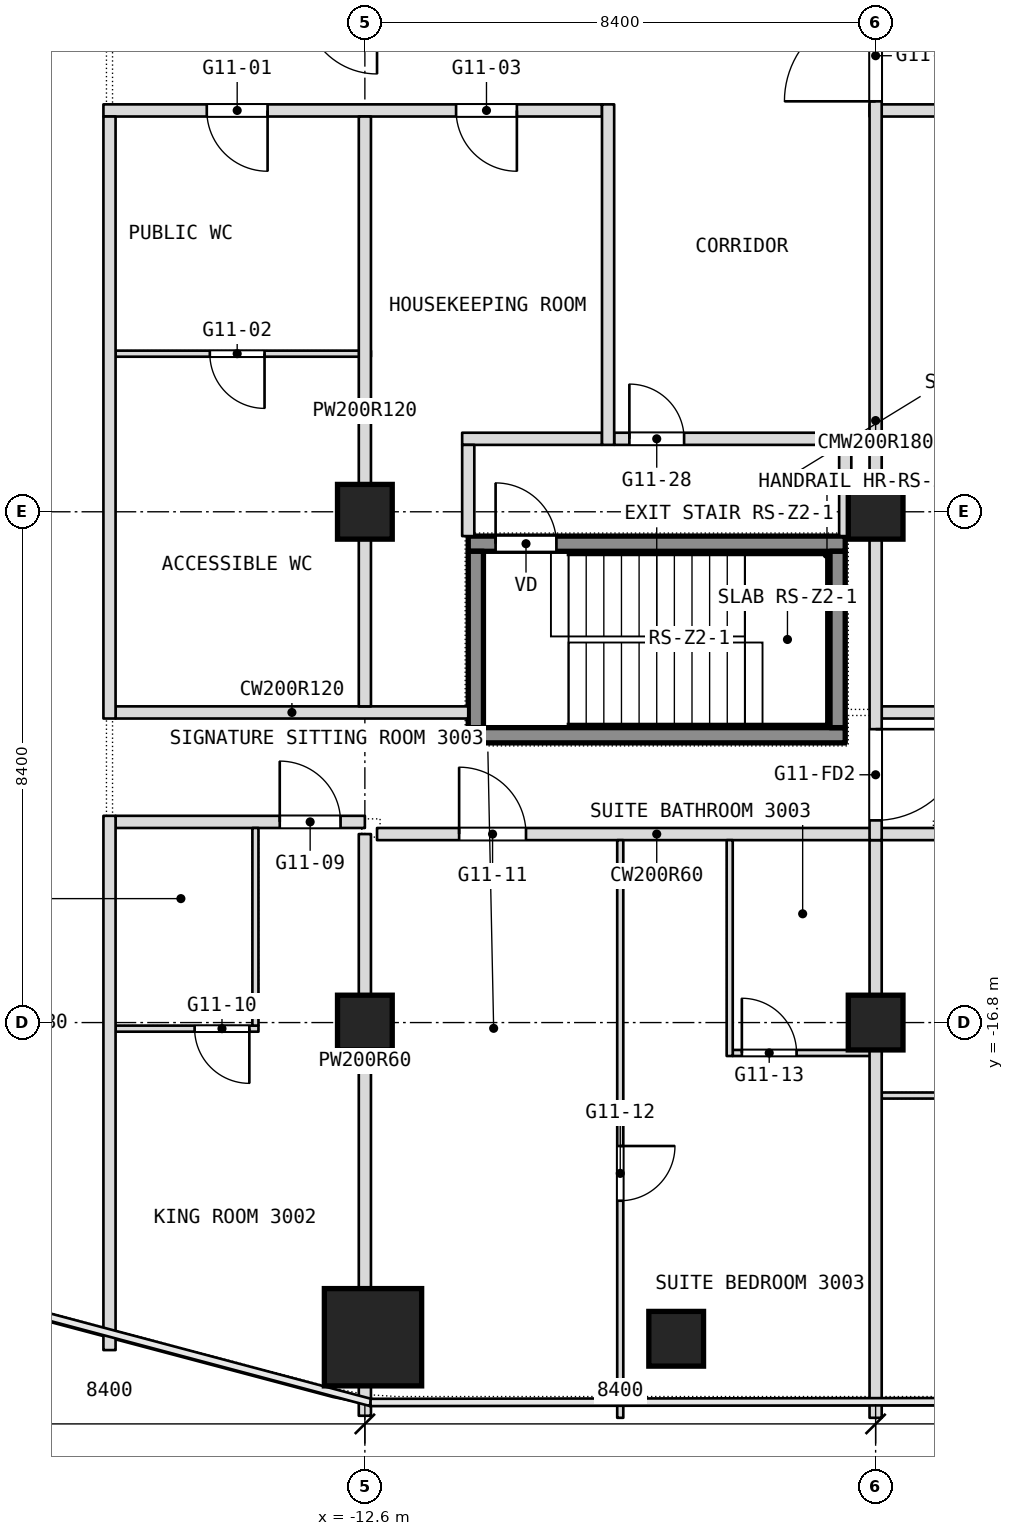
"""IFC4 building model, lengths in metres.
Left out: names, types, materials, properties, quantities, classifications, styles, units other than length and angle.
Written with IfcOpenShell. Run it as: python <this file> out.ifc"""

import sys

from ifc_helpers import new_model, si_unit, direction, frame, frame_2d, origin, origin_2d, place, context, subcontext, project, spatial, rectangle, extrude, element, fill, save


model = new_model("IFC4")
c1 = context("Model", 3, precision=1e-05, world=origin(), true_north=direction((0.0, 1.0)))
c2 = subcontext(c1, "Body", "Model", "MODEL_VIEW")
j1 = project(units=[si_unit("LENGTHUNIT", "METRE"), si_unit("PLANEANGLEUNIT", "RADIAN")], contexts=[c1])
p1 = place(None, origin())
s1 = spatial("IfcSite", under=j1, at=p1, CompositionType="ELEMENT")
p2 = place(p1, origin())
s2 = spatial("IfcBuilding", under=s1, at=p2, CompositionType="ELEMENT")
p3 = place(p2, frame((0.0, 0.0, 133.7)))
s3 = spatial("IfcBuildingStorey", under=s2, at=p3, CompositionType="ELEMENT", Elevation=133.7)
p4 = place(p3, frame((-12.466, -21.975, 0.0), z_axis=(0.0, 0.0, 1.0), x_axis=(1.0, 0.0, 0.0)))
e1 = element("IfcColumn", 1, at=p4, inside=s3, PredefinedType="COLUMN", context=c2, shape_type="SweptSolid", body=[
    extrude(rectangle(XDim=1.6, YDim=1.6, at=origin_2d()), origin(), (0.0, 0.0, 1.0), 3.6),
])
for number, where, z_axis, x_axis in (
    (2, (-12.6, -16.8, 0.0), (0.0, 0.0, 1.0), (1.0, 0.0, 0.0)),
    (3, (-12.6, -8.4, 0.0), (0.0, 0.0, 1.0), (1.0, 0.0, 0.0)),
    (4, (-4.2, -16.8, 0.0), (0.0, 0.0, 1.0), (1.0, 0.0, 0.0)),
    (5, (-4.2, -8.4, 0.0), (0.0, 0.0, 1.0), (1.0, 0.0, 0.0)),
    (6, (-7.48, -22.0, 0.0), (0.0, 0.0, 1.0), (1.0, 0.0, 0.0)),
):
    element("IfcColumn", number, at=place(p3, frame(where, z_axis=z_axis, x_axis=x_axis)), inside=s3, PredefinedType="COLUMN", context=c2, shape_type="SweptSolid", body=[
        extrude(rectangle(XDim=0.9, YDim=0.9, at=origin_2d()), origin(), (0.0, 0.0, 1.0), 3.6),
    ])
p5 = place(p3, frame((-4.1, -18.0, 0.0), z_axis=(0.0, 0.0, 1.0), x_axis=(1.0, 0.0, 0.0)))
e7 = element("IfcWall", 7, at=p5, inside=s3, PredefinedType="PARTITIONING", context=c2, shape_type="SweptSolid", body=[
    extrude(rectangle(XDim=3.55, YDim=0.1, at=frame_2d((1.775, 0.0))), origin(), (0.0, 0.0, 1.0), 3.34),
])
p6 = place(p3, frame((-6.55, -17.3, 0.0), z_axis=(0.0, 0.0, 1.0), x_axis=(1.0, 0.0, 0.0)))
e8 = element("IfcWall", 8, at=p6, inside=s3, PredefinedType="PARTITIONING", context=c2, shape_type="SweptSolid", body=[
    extrude(rectangle(XDim=2.45, YDim=0.1, at=frame_2d((1.225, 0.0))), origin(), (0.0, 0.0, 1.0), 3.34),
])
p7 = place(p6, frame((0.15, 0.0, 0.0)))
e9 = element("IfcOpeningElement", 9, at=p7, cuts=e8, PredefinedType="OPENING", context=c2, shape_type="SweptSolid", body=[
    extrude(rectangle(XDim=0.9, YDim=2.1, at=frame_2d((0.45, 1.05))), frame((0.0, 0.05, 0.0), z_axis=(0.0, -1.0, 0.0), x_axis=(1.0, 0.0, 0.0)), (0.0, 0.0, 1.0), 0.1),
])
p8 = place(p3, frame((-16.7, -16.9, 0.0), z_axis=(0.0, 0.0, 1.0), x_axis=(1.0, 0.0, 0.0)))
e10 = element("IfcWall", 10, at=p8, inside=s3, PredefinedType="PARTITIONING", context=c2, shape_type="SweptSolid", body=[
    extrude(rectangle(XDim=2.35, YDim=0.1, at=frame_2d((1.175, 0.0))), origin(), (0.0, 0.0, 1.0), 2.89),
])
p9 = place(p8, frame((1.3, 0.0, 0.0)))
e11 = element("IfcOpeningElement", 11, at=p9, cuts=e10, PredefinedType="OPENING", context=c2, shape_type="SweptSolid", body=[
    extrude(rectangle(XDim=0.9, YDim=2.1, at=frame_2d((0.45, 1.05))), frame((0.0, 0.05, 0.0), z_axis=(0.0, -1.0, 0.0), x_axis=(1.0, 0.0, 0.0)), (0.0, 0.0, 1.0), 0.1),
])
p10 = place(p3, frame((-12.4, -13.7, 0.0), z_axis=(0.0, 0.0, 1.0), x_axis=(1.0, 0.0, 0.0)))
e12 = element("IfcWall", 12, at=p10, inside=s3, PredefinedType="PARTITIONING", context=c2, shape_type="SweptSolid", body=[
    extrude(rectangle(XDim=9.2, YDim=0.2, at=frame_2d((4.6, 0.0))), origin(), (0.0, 0.0, 1.0), 3.34),
])
p11 = place(p10, frame((1.35, 0.0, 0.0)))
e13 = element("IfcOpeningElement", 13, at=p11, cuts=e12, PredefinedType="OPENING", context=c2, shape_type="SweptSolid", body=[
    extrude(rectangle(XDim=1.1, YDim=2.1, at=frame_2d((0.55, 1.05))), frame((0.0, 0.1, 0.0), z_axis=(0.0, -1.0, 0.0), x_axis=(1.0, 0.0, 0.0)), (0.0, 0.0, 1.0), 0.2),
])
p12 = place(p3, frame((-16.7, -13.5, 0.0), z_axis=(0.0, 0.0, 1.0), x_axis=(1.0, 0.0, 0.0)))
e14 = element("IfcWall", 14, at=p12, inside=s3, PredefinedType="PARTITIONING", context=c2, shape_type="SweptSolid", body=[
    extrude(rectangle(XDim=4.1, YDim=0.2, at=frame_2d((2.05, 0.0))), origin(), (0.0, 0.0, 1.0), 3.34),
])
p13 = place(p12, frame((2.7, 0.0, 0.0)))
e15 = element("IfcOpeningElement", 15, at=p13, cuts=e14, PredefinedType="OPENING", context=c2, shape_type="SweptSolid", body=[
    extrude(rectangle(XDim=1.0, YDim=2.1, at=frame_2d((0.5, 1.05))), frame((0.0, 0.1, 0.0), z_axis=(0.0, -1.0, 0.0), x_axis=(1.0, 0.0, 0.0)), (0.0, 0.0, 1.0), 0.2),
])
p14 = place(p3, frame((-16.7, -11.7, 0.0), z_axis=(0.0, 0.0, 1.0), x_axis=(1.0, 0.0, 0.0)))
e16 = element("IfcWall", 16, at=p14, inside=s3, PredefinedType="PARTITIONING", context=c2, shape_type="SweptSolid", body=[
    extrude(rectangle(XDim=5.8, YDim=0.2, at=frame_2d((2.9, 0.0))), origin(), (0.0, 0.0, 1.0), 3.34),
])
p15 = place(p3, frame((-4.1, -11.7, 0.0), z_axis=(0.0, 0.0, 1.0), x_axis=(1.0, 0.0, 0.0)))
e17 = element("IfcWall", 17, at=p15, inside=s3, PredefinedType="PARTITIONING", context=c2, shape_type="SweptSolid", body=[
    extrude(rectangle(XDim=20.8, YDim=0.2, at=frame_2d((10.4, 0.0))), origin(), (0.0, 0.0, 1.0), 3.34),
])
p16 = place(p15, frame((14.1, 0.0, 0.0)))
e18 = element("IfcOpeningElement", 18, at=p16, cuts=e17, PredefinedType="OPENING", context=c2, shape_type="SweptSolid", body=[
    extrude(rectangle(XDim=1.0, YDim=2.1, at=frame_2d((0.5, 1.05))), frame((0.0, 0.1, 0.0), z_axis=(0.0, -1.0, 0.0), x_axis=(1.0, 0.0, 0.0)), (0.0, 0.0, 1.0), 0.2),
])
p17 = place(p3, frame((-11.0, -7.2, 0.0), z_axis=(0.0, 0.0, 1.0), x_axis=(1.0, 0.0, 0.0)))
e19 = element("IfcWall", 19, at=p17, inside=s3, PredefinedType="PARTITIONING", context=c2, shape_type="SweptSolid", body=[
    extrude(rectangle(XDim=2.3, YDim=0.2, at=frame_2d((1.15, 0.0))), origin(), (0.0, 0.0, 1.0), 3.34),
])
p18 = place(p3, frame((-8.5, -7.2, 0.0), z_axis=(0.0, 0.0, 1.0), x_axis=(1.0, 0.0, 0.0)))
e20 = element("IfcWall", 20, at=p18, inside=s3, PredefinedType="PARTITIONING", context=c2, shape_type="SweptSolid", body=[
    extrude(rectangle(XDim=3.7, YDim=0.2, at=frame_2d((1.85, 0.0))), origin(), (0.0, 0.0, 1.0), 3.34),
])
p19 = place(p18, frame((0.25, 0.0, 0.0)))
e21 = element("IfcOpeningElement", 21, at=p19, cuts=e20, PredefinedType="OPENING", context=c2, shape_type="SweptSolid", body=[
    extrude(rectangle(XDim=0.9, YDim=2.1, at=frame_2d((0.45, 1.05))), frame((0.0, 0.1, 0.0), z_axis=(0.0, -1.0, 0.0), x_axis=(1.0, 0.0, 0.0)), (0.0, 0.0, 1.0), 0.2),
])
p20 = place(p3, frame((-16.7, -5.8, 0.0), z_axis=(0.0, 0.0, 1.0), x_axis=(1.0, 0.0, 0.0)))
e22 = element("IfcWall", 22, at=p20, inside=s3, PredefinedType="PARTITIONING", context=c2, shape_type="SweptSolid", body=[
    extrude(rectangle(XDim=4.2, YDim=0.1, at=frame_2d((2.1, 0.0))), origin(), (0.0, 0.0, 1.0), 3.34),
])
p21 = place(p20, frame((1.55, 0.0, 0.0)))
e23 = element("IfcOpeningElement", 23, at=p21, cuts=e22, PredefinedType="OPENING", context=c2, shape_type="SweptSolid", body=[
    extrude(rectangle(XDim=0.9, YDim=2.1, at=frame_2d((0.45, 1.05))), frame((0.0, 0.05, 0.0), z_axis=(0.0, -1.0, 0.0), x_axis=(1.0, 0.0, 0.0)), (0.0, 0.0, 1.0), 0.1),
])
p22 = place(p3, frame((-16.9, -1.8, 0.0), z_axis=(0.0, 0.0, 1.0), x_axis=(1.0, 0.0, 0.0)))
e24 = element("IfcWall", 24, at=p22, inside=s3, PredefinedType="PARTITIONING", context=c2, shape_type="SweptSolid", body=[
    extrude(rectangle(XDim=8.2, YDim=0.2, at=frame_2d((4.1, 0.0))), origin(), (0.0, 0.0, 1.0), 3.34),
])
p23 = place(p22, frame((1.7, 0.0, 0.0)))
e25 = element("IfcOpeningElement", 25, at=p23, cuts=e24, PredefinedType="OPENING", context=c2, shape_type="SweptSolid", body=[
    extrude(rectangle(XDim=1.0, YDim=2.1, at=frame_2d((0.5, 1.05))), frame((0.0, 0.1, 0.0), z_axis=(0.0, -1.0, 0.0), x_axis=(1.0, 0.0, 0.0)), (0.0, 0.0, 1.0), 0.2),
])
p24 = place(p22, frame((5.8, 0.0, 0.0)))
e26 = element("IfcOpeningElement", 26, at=p24, cuts=e24, PredefinedType="OPENING", context=c2, shape_type="SweptSolid", body=[
    extrude(rectangle(XDim=1.0, YDim=2.1, at=frame_2d((0.5, 1.05))), frame((0.0, 0.1, 0.0), z_axis=(0.0, -1.0, 0.0), x_axis=(1.0, 0.0, 0.0)), (0.0, 0.0, 1.0), 0.2),
])
p25 = place(p3, frame((-4.3, -1.8, 0.0), z_axis=(0.0, 0.0, 1.0), x_axis=(1.0, 0.0, 0.0)))
e27 = element("IfcWall", 27, at=p25, inside=s3, PredefinedType="PARTITIONING", context=c2, shape_type="SweptSolid", body=[
    extrude(rectangle(XDim=11.3, YDim=0.2, at=frame_2d((5.65, 0.0))), origin(), (0.0, 0.0, 1.0), 3.34),
])
p26 = place(p25, frame((3.4, 0.0, 0.0)))
e28 = element("IfcOpeningElement", 28, at=p26, cuts=e27, PredefinedType="OPENING", context=c2, shape_type="SweptSolid", body=[
    extrude(rectangle(XDim=1.8, YDim=2.1, at=frame_2d((0.9, 1.05))), frame((0.0, 0.1, 0.0), z_axis=(0.0, -1.0, 0.0), x_axis=(1.0, 0.0, 0.0)), (0.0, 0.0, 1.0), 0.2),
])
p27 = place(p25, frame((10.1, 0.0, 0.0)))
e29 = element("IfcOpeningElement", 29, at=p27, cuts=e27, PredefinedType="OPENING", context=c2, shape_type="SweptSolid", body=[
    extrude(rectangle(XDim=1.0, YDim=2.1, at=frame_2d((0.5, 1.05))), frame((0.0, 0.1, 0.0), z_axis=(0.0, -1.0, 0.0), x_axis=(1.0, 0.0, 0.0)), (0.0, 0.0, 1.0), 0.2),
])
p28 = place(p3, frame((-4.2, -23.3, 0.0), z_axis=(0.0, 0.0, 1.0), x_axis=(0.0, 1.0, 0.0)))
e30 = element("IfcWall", 30, at=p28, inside=s3, PredefinedType="PARTITIONING", context=c2, shape_type="SweptSolid", body=[
    extrude(rectangle(XDim=9.5, YDim=0.2, at=frame_2d((4.75, 0.0))), origin(), (0.0, 0.0, 1.0), 3.34),
])
p29 = place(p3, frame((-4.2, -13.8, 0.0), z_axis=(0.0, 0.0, 1.0), x_axis=(0.0, 1.0, 0.0)))
e31 = element("IfcWall", 31, at=p29, inside=s3, PredefinedType="PARTITIONING", context=c2, shape_type="SweptSolid", body=[
    extrude(rectangle(XDim=13.8, YDim=0.2, at=frame_2d((6.9, 0.0))), origin(), (0.0, 0.0, 1.0), 3.34),
])
p30 = place(p29, frame((12.15, 0.0, 0.0)))
e32 = element("IfcOpeningElement", 32, at=p30, cuts=e31, PredefinedType="OPENING", context=c2, shape_type="SweptSolid", body=[
    extrude(rectangle(XDim=1.5, YDim=2.1, at=frame_2d((0.75, 1.05))), frame((0.0, 0.1, 0.0), z_axis=(0.0, -1.0, 0.0), x_axis=(1.0, 0.0, 0.0)), (0.0, 0.0, 1.0), 0.2),
])
p31 = place(p29, frame((0.325, 0.0, 0.0)))
e33 = element("IfcOpeningElement", 33, at=p31, cuts=e31, PredefinedType="OPENING", context=c2, shape_type="SweptSolid", body=[
    extrude(rectangle(XDim=1.5, YDim=2.1, at=frame_2d((0.75, 1.05))), frame((0.0, 0.1, 0.0), z_axis=(0.0, -1.0, 0.0), x_axis=(1.0, 0.0, 0.0)), (0.0, 0.0, 1.0), 0.2),
])
p32 = place(p3, frame((-4.7, -8.8, 0.0), z_axis=(0.0, 0.0, 1.0), x_axis=(0.0, 1.0, 0.0)))
e34 = element("IfcWall", 34, at=p32, inside=s3, PredefinedType="PARTITIONING", context=c2, shape_type="SweptSolid", body=[
    extrude(rectangle(XDim=1.7, YDim=0.2, at=frame_2d((0.85, 0.0))), origin(), (0.0, 0.0, 1.0), 3.34),
])
p33 = place(p3, frame((-6.6, -17.35, 0.0), z_axis=(0.0, 0.0, 1.0), x_axis=(0.0, 1.0, 0.0)))
e35 = element("IfcWall", 35, at=p33, inside=s3, PredefinedType="PARTITIONING", context=c2, shape_type="SweptSolid", body=[
    extrude(rectangle(XDim=3.55, YDim=0.1, at=frame_2d((1.775, 0.0))), origin(), (0.0, 0.0, 1.0), 3.34),
])
p34 = place(p3, frame((-8.4, -23.3, 0.0), z_axis=(0.0, 0.0, 1.0), x_axis=(0.0, 1.0, 0.0)))
e36 = element("IfcWall", 36, at=p34, inside=s3, PredefinedType="PARTITIONING", context=c2, shape_type="SweptSolid", body=[
    extrude(rectangle(XDim=9.5, YDim=0.1, at=frame_2d((4.75, 0.0))), origin(), (0.0, 0.0, 1.0), 3.34),
])
p35 = place(p34, frame((3.57, 0.0, 0.0)))
e37 = element("IfcOpeningElement", 37, at=p35, cuts=e36, PredefinedType="OPENING", context=c2, shape_type="SweptSolid", body=[
    extrude(rectangle(XDim=0.9, YDim=2.1, at=frame_2d((0.45, 1.05))), frame((0.0, 0.05, 0.0), z_axis=(0.0, -1.0, 0.0), x_axis=(1.0, 0.0, 0.0)), (0.0, 0.0, 1.0), 0.1),
])
p36 = place(p3, frame((-8.6, -7.3, 0.0), z_axis=(0.0, 0.0, 1.0), x_axis=(0.0, 1.0, 0.0)))
e38 = element("IfcWall", 38, at=p36, inside=s3, PredefinedType="PARTITIONING", context=c2, shape_type="SweptSolid", body=[
    extrude(rectangle(XDim=5.6, YDim=0.2, at=frame_2d((2.8, 0.0))), origin(), (0.0, 0.0, 1.0), 3.34),
])
p37 = place(p3, frame((-10.9, -8.8, 0.0), z_axis=(0.0, 0.0, 1.0), x_axis=(0.0, 1.0, 0.0)))
e39 = element("IfcWall", 39, at=p37, inside=s3, PredefinedType="PARTITIONING", context=c2, shape_type="SweptSolid", body=[
    extrude(rectangle(XDim=1.5, YDim=0.2, at=frame_2d((0.75, 0.0))), origin(), (0.0, 0.0, 1.0), 3.34),
])
p38 = place(p3, frame((-12.6, -23.266, 0.0), z_axis=(0.0, 0.0, 1.0), x_axis=(0.0, 1.0, 0.0)))
e40 = element("IfcWall", 40, at=p38, inside=s3, PredefinedType="PARTITIONING", context=c2, shape_type="SweptSolid", body=[
    extrude(rectangle(XDim=0.491, YDim=0.2, at=frame_2d((0.246, 0.0))), origin(), (0.0, 0.0, 1.0), 3.34),
])
p39 = place(p3, frame((-12.6, -21.175, 0.0), z_axis=(0.0, 0.0, 1.0), x_axis=(0.0, 1.0, 0.0)))
e41 = element("IfcWall", 41, at=p39, inside=s3, PredefinedType="PARTITIONING", context=c2, shape_type="SweptSolid", body=[
    extrude(rectangle(XDim=7.475, YDim=0.2, at=frame_2d((3.738, 0.0))), origin(), (0.0, 0.0, 1.0), 3.34),
])
p40 = place(p3, frame((-12.6, -11.6, 0.0), z_axis=(0.0, 0.0, 1.0), x_axis=(0.0, 1.0, 0.0)))
e42 = element("IfcWall", 42, at=p40, inside=s3, PredefinedType="PARTITIONING", context=c2, shape_type="SweptSolid", body=[
    extrude(rectangle(XDim=9.7, YDim=0.2, at=frame_2d((4.85, 0.0))), origin(), (0.0, 0.0, 1.0), 3.34),
])
p41 = place(p3, frame((-14.4, -16.85, 0.0), z_axis=(0.0, 0.0, 1.0), x_axis=(0.0, 1.0, 0.0)))
e43 = element("IfcWall", 43, at=p41, inside=s3, PredefinedType="PARTITIONING", context=c2, shape_type="SweptSolid", body=[
    extrude(rectangle(XDim=3.25, YDim=0.1, at=frame_2d((1.625, 0.0))), origin(), (0.0, 0.0, 1.0), 3.34),
])
p42 = place(p3, frame((-16.8, -22.186, 0.0), z_axis=(0.0, 0.0, 1.0), x_axis=(0.0, 1.0, 0.0)))
e44 = element("IfcWall", 44, at=p42, inside=s3, PredefinedType="PARTITIONING", context=c2, shape_type="SweptSolid", body=[
    extrude(rectangle(XDim=8.786, YDim=0.2, at=frame_2d((4.393, 0.0))), origin(), (0.0, 0.0, 1.0), 3.34),
])
p43 = place(p3, frame((-16.8, -11.8, 0.0), z_axis=(0.0, 0.0, 1.0), x_axis=(0.0, 1.0, 0.0)))
e45 = element("IfcWall", 45, at=p43, inside=s3, PredefinedType="PARTITIONING", context=c2, shape_type="SweptSolid", body=[
    extrude(rectangle(XDim=9.9, YDim=0.2, at=frame_2d((4.95, 0.0))), origin(), (0.0, 0.0, 1.0), 3.34),
])
p44 = place(p3, frame((-10.9, -12.075, 0.1), z_axis=(0.0, 0.0, 1.0), x_axis=(1.0, 0.0, 0.0)))
e46 = element("IfcWall", 46, at=p44, inside=s3, PredefinedType="SHEAR", context=c2, shape_type="SweptSolid", body=[
    extrude(rectangle(XDim=6.2, YDim=0.25, at=frame_2d((3.1, 0.0))), origin(), (0.0, 0.0, 1.0), 3.6),
])
p45 = place(p3, frame((-10.9, -8.925, 0.1), z_axis=(0.0, 0.0, 1.0), x_axis=(1.0, 0.0, 0.0)))
e47 = element("IfcWall", 47, at=p45, inside=s3, PredefinedType="SHEAR", context=c2, shape_type="SweptSolid", body=[
    extrude(rectangle(XDim=6.2, YDim=0.25, at=frame_2d((3.1, 0.0))), origin(), (0.0, 0.0, 1.0), 3.6),
])
p46 = place(p45, frame((0.45, 0.0, 0.0)))
e48 = element("IfcOpeningElement", 48, at=p46, cuts=e47, PredefinedType="OPENING", context=c2, shape_type="SweptSolid", body=[
    extrude(rectangle(XDim=1.0, YDim=2.1, at=frame_2d((0.5, 1.05))), frame((0.0, 0.125, 0.0), z_axis=(0.0, -1.0, 0.0), x_axis=(1.0, 0.0, 0.0)), (0.0, 0.0, 1.0), 0.25),
])
for number, where, z_axis, x_axis in (
    (49, (-10.775, -11.95, 0.1), (0.0, 0.0, 1.0), (0.0, 1.0, 0.0)),
    (50, (-4.825, -11.95, 0.1), (0.0, 0.0, 1.0), (0.0, 1.0, 0.0)),
):
    element("IfcWall", number, at=place(p3, frame(where, z_axis=z_axis, x_axis=x_axis)), inside=s3, PredefinedType="SHEAR", context=c2, shape_type="SweptSolid", body=[
        extrude(rectangle(XDim=2.9, YDim=0.25, at=frame_2d((1.45, 0.0))), origin(), (0.0, 0.0, 1.0), 3.6),
    ])
p47 = place(p7, origin())
e51 = element("IfcDoor", 51, at=p47, inside=s3, OperationType="SINGLE_SWING_LEFT", PredefinedType="DOOR", context=c2, shape_type="SweptSolid", body=[
    extrude(rectangle(XDim=0.9, YDim=2.1, at=frame_2d((0.45, 1.05))), frame((0.0, 0.025, 0.0), z_axis=(0.0, -1.0, 0.0), x_axis=(1.0, 0.0, 0.0)), (0.0, 0.0, 1.0), 0.05),
])
fill(e9, e51)
p48 = place(p9, origin())
e52 = element("IfcDoor", 52, at=p48, inside=s3, OperationType="SINGLE_SWING_RIGHT", PredefinedType="DOOR", context=c2, shape_type="SweptSolid", body=[
    extrude(rectangle(XDim=0.9, YDim=2.1, at=frame_2d((0.45, 1.05))), frame((0.0, 0.025, 0.0), z_axis=(0.0, -1.0, 0.0), x_axis=(1.0, 0.0, 0.0)), (0.0, 0.0, 1.0), 0.05),
])
fill(e11, e52)
p49 = place(p11, origin())
e53 = element("IfcDoor", 53, at=p49, inside=s3, OperationType="SINGLE_SWING_RIGHT", PredefinedType="DOOR", context=c2, shape_type="SweptSolid", body=[
    extrude(rectangle(XDim=1.1, YDim=2.1, at=frame_2d((0.55, 1.05))), frame((0.0, 0.025, 0.0), z_axis=(0.0, -1.0, 0.0), x_axis=(1.0, 0.0, 0.0)), (0.0, 0.0, 1.0), 0.05),
])
fill(e13, e53)
p50 = place(p13, origin())
e54 = element("IfcDoor", 54, at=p50, inside=s3, OperationType="SINGLE_SWING_LEFT", PredefinedType="DOOR", context=c2, shape_type="SweptSolid", body=[
    extrude(rectangle(XDim=1.0, YDim=2.1, at=frame_2d((0.5, 1.05))), frame((0.0, 0.025, 0.0), z_axis=(0.0, -1.0, 0.0), x_axis=(1.0, 0.0, 0.0)), (0.0, 0.0, 1.0), 0.05),
])
fill(e15, e54)
p51 = place(p19, origin())
e55 = element("IfcDoor", 55, at=p51, inside=s3, OperationType="SINGLE_SWING_RIGHT", PredefinedType="DOOR", context=c2, shape_type="SweptSolid", body=[
    extrude(rectangle(XDim=0.9, YDim=2.1, at=frame_2d((0.45, 1.05))), frame((0.0, 0.025, 0.0), z_axis=(0.0, -1.0, 0.0), x_axis=(1.0, 0.0, 0.0)), (0.0, 0.0, 1.0), 0.05),
])
fill(e21, e55)
p52 = place(p21, origin())
e56 = element("IfcDoor", 56, at=p52, inside=s3, OperationType="SINGLE_SWING_RIGHT", PredefinedType="DOOR", context=c2, shape_type="SweptSolid", body=[
    extrude(rectangle(XDim=0.9, YDim=2.1, at=frame_2d((0.45, 1.05))), frame((0.0, 0.025, 0.0), z_axis=(0.0, -1.0, 0.0), x_axis=(1.0, 0.0, 0.0)), (0.0, 0.0, 1.0), 0.05),
])
fill(e23, e56)
p53 = place(p23, origin())
e57 = element("IfcDoor", 57, at=p53, inside=s3, OperationType="SINGLE_SWING_LEFT", PredefinedType="DOOR", context=c2, shape_type="SweptSolid", body=[
    extrude(rectangle(XDim=1.0, YDim=2.1, at=frame_2d((0.5, 1.05))), frame((0.0, 0.025, 0.0), z_axis=(0.0, -1.0, 0.0), x_axis=(1.0, 0.0, 0.0)), (0.0, 0.0, 1.0), 0.05),
])
fill(e25, e57)
p54 = place(p24, origin())
e58 = element("IfcDoor", 58, at=p54, inside=s3, OperationType="SINGLE_SWING_LEFT", PredefinedType="DOOR", context=c2, shape_type="SweptSolid", body=[
    extrude(rectangle(XDim=1.0, YDim=2.1, at=frame_2d((0.5, 1.05))), frame((0.0, 0.025, 0.0), z_axis=(0.0, -1.0, 0.0), x_axis=(1.0, 0.0, 0.0)), (0.0, 0.0, 1.0), 0.05),
])
fill(e26, e58)
p55 = place(p35, origin())
e59 = element("IfcDoor", 59, at=p55, inside=s3, OperationType="SINGLE_SWING_RIGHT", PredefinedType="DOOR", context=c2, shape_type="SweptSolid", body=[
    extrude(rectangle(XDim=0.9, YDim=2.1, at=frame_2d((0.45, 1.05))), frame((0.0, 0.025, 0.0), z_axis=(0.0, -1.0, 0.0), x_axis=(1.0, 0.0, 0.0)), (0.0, 0.0, 1.0), 0.05),
])
fill(e37, e59)
p56 = place(p46, origin())
e60 = element("IfcDoor", 60, at=p56, inside=s3, OperationType="SINGLE_SWING_LEFT", PredefinedType="DOOR", context=c2, shape_type="SweptSolid", body=[
    extrude(rectangle(XDim=1.0, YDim=2.1, at=frame_2d((0.5, 1.05))), frame((0.0, 0.025, 0.0), z_axis=(0.0, -1.0, 0.0), x_axis=(1.0, 0.0, 0.0)), (0.0, 0.0, 1.0), 0.05),
])
fill(e48, e60)
p57 = place(p30, origin())
e61 = element("IfcDoor", 61, at=p57, inside=s3, OperationType="DOUBLE_DOOR_DOUBLE_SWING", PredefinedType="DOOR", context=c2, shape_type="SweptSolid", body=[
    extrude(rectangle(XDim=1.5, YDim=2.1, at=frame_2d((0.75, 1.05))), frame((0.0, 0.025, 0.0), z_axis=(0.0, -1.0, 0.0), x_axis=(1.0, 0.0, 0.0)), (0.0, 0.0, 1.0), 0.05),
])
fill(e32, e61)
p58 = place(p31, origin())
e62 = element("IfcDoor", 62, at=p58, inside=s3, OperationType="DOUBLE_DOOR_DOUBLE_SWING", PredefinedType="DOOR", context=c2, shape_type="SweptSolid", body=[
    extrude(rectangle(XDim=1.5, YDim=2.1, at=frame_2d((0.75, 1.05))), frame((0.0, 0.025, 0.0), z_axis=(0.0, -1.0, 0.0), x_axis=(1.0, 0.0, 0.0)), (0.0, 0.0, 1.0), 0.05),
])
fill(e33, e62)
save(model, sys.argv[1])
